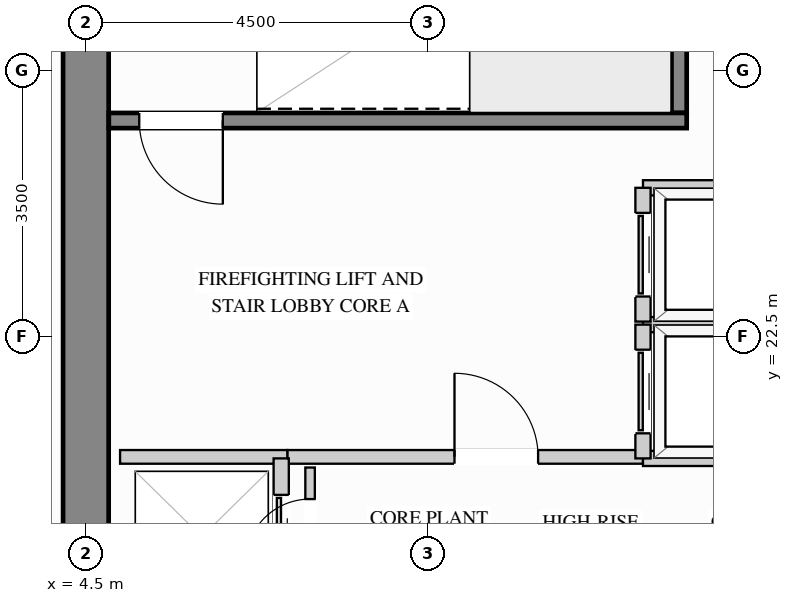
"""IFC4 building model, lengths in metres.
Left out: names, types, materials, properties, quantities, classifications, styles, units other than length and angle.
Written with IfcOpenShell. Run it as: python <this file> out.ifc"""

import sys

from ifc_helpers import new_model, si_unit, direction, frame, frame_2d, origin, place, context, subcontext, project, spatial, rectangle, extrude, source, transform, mapped, element, fill, save


model = new_model("IFC4")
c1 = context("Model", 3, precision=1e-05, world=origin(), true_north=direction((0.0, 1.0)))
c2 = subcontext(c1, "Body", "Model", "MODEL_VIEW")
j1 = project(units=[si_unit("LENGTHUNIT", "METRE"), si_unit("PLANEANGLEUNIT", "RADIAN")], contexts=[c1])
p1 = place(None, origin())
s1 = spatial("IfcSite", under=j1, at=p1, CompositionType="ELEMENT")
p2 = place(p1, origin())
s2 = spatial("IfcBuilding", under=s1, at=p2, CompositionType="ELEMENT")
p3 = place(p2, frame((0.0, 0.0, 186.3)))
s3 = spatial("IfcBuildingStorey", under=s2, at=p3, CompositionType="ELEMENT", Elevation=186.3)
m1 = source(origin(), c2, "Body", "SweptSolid", [
    extrude(rectangle(XDim=20.4, YDim=0.6, at=frame_2d((10.2, 0.0))), origin(), (0.0, 0.0, 1.0), 3.4),
])
p4 = place(p3, frame((4.5, 8.8, 0.0), z_axis=(0.0, 0.0, 1.0), x_axis=(0.0, 1.0, 0.0)))
e1 = element("IfcWall", 1, at=p4, inside=s3, PredefinedType="SHEAR", context=c2, shape_type="MappedRepresentation", body=[
    mapped(m1, transform((0.0, 0.0, 0.0), x_axis=(1.0, 0.0, 0.0), y_axis=(0.0, 1.0, 0.0), z_axis=(0.0, 0.0, 1.0))),
])
p5 = place(p3, frame((7.15, 20.92, 0.0), z_axis=(0.0, 0.0, 1.0), x_axis=(1.0, 0.0, 0.0)))
e2 = element("IfcWall", 2, at=p5, inside=s3, PredefinedType="PARTITIONING", context=c2, shape_type="SweptSolid", body=[
    extrude(rectangle(XDim=4.68, YDim=0.18, at=frame_2d((2.34, 0.0))), origin(), (0.0, 0.0, 1.0), 3.385),
])
p6 = place(p5, frame((2.2, 0.0, 0.0)))
e3 = element("IfcOpeningElement", 3, at=p6, cuts=e2, PredefinedType="OPENING", context=c2, shape_type="SweptSolid", body=[
    extrude(rectangle(XDim=1.1, YDim=2.15, at=frame_2d((0.55, 1.075))), frame((0.0, 0.1, 0.0), z_axis=(0.0, -1.0, 0.0), x_axis=(1.0, 0.0, 0.0)), (0.0, 0.0, 1.0), 0.2),
])
m2 = source(origin(), c2, "Body", "SweptSolid", [
    extrude(rectangle(XDim=2.2, YDim=0.18, at=frame_2d((1.1, 0.0))), origin(), (0.0, 0.0, 1.0), 3.385),
])
p7 = place(p3, frame((4.95, 20.92, 0.0), z_axis=(0.0, 0.0, 1.0), x_axis=(1.0, 0.0, 0.0)))
e4 = element("IfcWall", 4, at=p7, inside=s3, PredefinedType="PARTITIONING", context=c2, shape_type="MappedRepresentation", body=[
    mapped(m2, transform((0.0, 0.0, 0.0), x_axis=(1.0, 0.0, 0.0), y_axis=(0.0, 1.0, 0.0), z_axis=(0.0, 0.0, 1.0))),
])
p8 = place(p3, frame((7.45, 19.2, 0.0), z_axis=(0.0, 0.0, 1.0), x_axis=(0.0, 1.0, 0.0)))
e5 = element("IfcWall", 5, at=p8, inside=s3, PredefinedType="PARTITIONING", context=c2, shape_type="SweptSolid", body=[
    extrude(rectangle(XDim=1.58, YDim=0.125, at=frame_2d((0.79, 0.0))), origin(), (0.0, 0.0, 1.0), 3.385),
])
p9 = place(p8, frame((0.315, 0.0, 0.0)))
e6 = element("IfcOpeningElement", 6, at=p9, cuts=e5, PredefinedType="OPENING", context=c2, shape_type="SweptSolid", body=[
    extrude(rectangle(XDim=0.85, YDim=2.1, at=frame_2d((0.425, 1.05))), frame((0.0, 0.073, 0.0), z_axis=(0.0, -1.0, 0.0), x_axis=(1.0, 0.0, 0.0)), (0.0, 0.0, 1.0), 0.145),
])
m3 = source(origin(), c2, "Body", "SweptSolid", [
    extrude(rectangle(XDim=2.34, YDim=0.2, at=frame_2d((1.17, 0.0))), origin(), (0.0, 0.0, 1.0), 3.385),
])
for number, where, z_axis, x_axis in (
    (7, (11.83, 22.66, 0.0), (0.0, 0.0, 1.0), (1.0, 0.0, 0.0)),
    (8, (11.83, 20.9, 0.0), (0.0, 0.0, 1.0), (1.0, 0.0, 0.0)),
):
    element("IfcWall", number, at=place(p3, frame(where, z_axis=z_axis, x_axis=x_axis)), inside=s3, PredefinedType="PARTITIONING", context=c2, shape_type="MappedRepresentation", body=[
        mapped(m3, transform((0.0, 0.0, 0.0), x_axis=(1.0, 0.0, 0.0), y_axis=(0.0, 1.0, 0.0), z_axis=(0.0, 0.0, 1.0))),
    ])
p10 = place(p3, frame((11.83, 20.9, 0.0), z_axis=(0.0, 0.0, 1.0), x_axis=(0.0, 1.0, 0.0)))
e9 = element("IfcWall", 9, at=p10, inside=s3, PredefinedType="PARTITIONING", context=c2, shape_type="SweptSolid", body=[
    extrude(rectangle(XDim=1.76, YDim=0.2, at=frame_2d((0.88, 0.0))), origin(), (0.0, 0.0, 1.0), 3.385),
])
p11 = place(p10, frame((0.33, 0.0, 0.0)))
e10 = element("IfcOpeningElement", 10, at=p11, cuts=e9, PredefinedType="OPENING", context=c2, shape_type="SweptSolid", body=[
    extrude(rectangle(XDim=1.1, YDim=2.2, at=frame_2d((0.55, 1.1))), frame((0.0, 0.11, 0.0), z_axis=(0.0, -1.0, 0.0), x_axis=(1.0, 0.0, 0.0)), (0.0, 0.0, 1.0), 0.22),
])
p12 = place(p3, frame((11.83, 24.46, 0.0), z_axis=(0.0, 0.0, 1.0), x_axis=(1.0, 0.0, 0.0)))
e11 = element("IfcWall", 11, at=p12, inside=s3, PredefinedType="PARTITIONING", context=c2, shape_type="MappedRepresentation", body=[
    mapped(m3, transform((0.0, 0.0, 0.0), x_axis=(1.0, 0.0, 0.0), y_axis=(0.0, 1.0, 0.0), z_axis=(0.0, 0.0, 1.0))),
])
p13 = place(p3, frame((11.83, 22.7, 0.0), z_axis=(0.0, 0.0, 1.0), x_axis=(0.0, 1.0, 0.0)))
e12 = element("IfcWall", 12, at=p13, inside=s3, PredefinedType="PARTITIONING", context=c2, shape_type="SweptSolid", body=[
    extrude(rectangle(XDim=1.76, YDim=0.2, at=frame_2d((0.88, 0.0))), origin(), (0.0, 0.0, 1.0), 3.385),
])
p14 = place(p13, frame((0.33, 0.0, 0.0)))
e13 = element("IfcOpeningElement", 13, at=p14, cuts=e12, PredefinedType="OPENING", context=c2, shape_type="SweptSolid", body=[
    extrude(rectangle(XDim=1.1, YDim=2.2, at=frame_2d((0.55, 1.1))), frame((0.0, 0.11, 0.0), z_axis=(0.0, -1.0, 0.0), x_axis=(1.0, 0.0, 0.0)), (0.0, 0.0, 1.0), 0.22),
])
p15 = place(p3, frame((7.07, 18.84, 0.0), z_axis=(0.0, 0.0, 1.0), x_axis=(0.0, 1.0, 0.0)))
e14 = element("IfcWall", 14, at=p15, inside=s3, PredefinedType="PARTITIONING", context=c2, shape_type="SweptSolid", body=[
    extrude(rectangle(XDim=2.06, YDim=0.2, at=frame_2d((1.03, 0.0))), origin(), (0.0, 0.0, 1.0), 3.385),
])
p16 = place(p15, frame((0.48, 0.0, 0.0)))
e15 = element("IfcOpeningElement", 15, at=p16, cuts=e14, PredefinedType="OPENING", context=c2, shape_type="SweptSolid", body=[
    extrude(rectangle(XDim=1.1, YDim=2.2, at=frame_2d((0.55, 1.1))), frame((0.0, 0.11, 0.0), z_axis=(0.0, -1.0, 0.0), x_axis=(1.0, 0.0, 0.0)), (0.0, 0.0, 1.0), 0.22),
])
m4 = source(origin(), c2, "Body", "SweptSolid", [
    extrude(rectangle(XDim=3.753, YDim=0.2, at=frame_2d((1.876, 0.0))), origin(), (0.0, 0.0, 1.0), 3.4),
])
p17 = place(p3, frame((12.305, 25.445, 0.0), z_axis=(0.0, 0.0, 1.0), x_axis=(0.0, 1.0, 0.0)))
e16 = element("IfcWall", 16, at=p17, inside=s3, PredefinedType="SHEAR", context=c2, shape_type="MappedRepresentation", body=[
    mapped(m4, transform((0.0, 0.0, 0.0), x_axis=(1.0, 0.0, 0.0), y_axis=(0.0, 1.0, 0.0), z_axis=(0.0, 0.0, 1.0))),
])
p18 = place(p3, frame((4.802, 25.345, 0.0), z_axis=(0.0, 0.0, 1.0), x_axis=(1.0, 0.0, 0.0)))
e17 = element("IfcWall", 17, at=p18, inside=s3, PredefinedType="SHEAR", context=c2, shape_type="SweptSolid", body=[
    extrude(rectangle(XDim=7.603, YDim=0.2, at=frame_2d((3.802, 0.0))), origin(), (0.0, 0.0, 1.0), 3.4),
])
p19 = place(p18, frame((0.4, 0.0, 0.0)))
e18 = element("IfcOpeningElement", 18, at=p19, cuts=e17, PredefinedType="OPENING", context=c2, shape_type="SweptSolid", body=[
    extrude(rectangle(XDim=1.1, YDim=2.15, at=frame_2d((0.55, 1.075))), frame((0.0, 0.11, 0.0), z_axis=(0.0, -1.0, 0.0), x_axis=(1.0, 0.0, 0.0)), (0.0, 0.0, 1.0), 0.22),
])
m5 = source(origin(), c2, "Body", "SweptSolid", [
    extrude(rectangle(XDim=1.1, YDim=2.15, at=frame_2d((0.55, 1.075))), frame((0.0, 0.025, 0.0), z_axis=(0.0, -1.0, 0.0), x_axis=(1.0, 0.0, 0.0)), (0.0, 0.0, 1.0), 0.05),
])
p20 = place(p6, origin())
e19 = element("IfcDoor", 19, at=p20, inside=s3, OperationType="SINGLE_SWING_LEFT", PredefinedType="DOOR", context=c2, shape_type="MappedRepresentation", body=[
    mapped(m5, transform((0.0, 0.0, 0.0), x_axis=(1.0, 0.0, 0.0), y_axis=(0.0, 1.0, 0.0), z_axis=(0.0, 0.0, 1.0))),
])
fill(e3, e19)
m6 = source(origin(), c2, "Body", "SweptSolid", [
    extrude(rectangle(XDim=1.1, YDim=2.2, at=frame_2d((0.55, 1.1))), frame((0.0, 0.025, 0.0), z_axis=(0.0, -1.0, 0.0), x_axis=(1.0, 0.0, 0.0)), (0.0, 0.0, 1.0), 0.05),
])
p21 = place(p11, origin())
e20 = element("IfcDoor", 20, at=p21, inside=s3, OperationType="SLIDING_TO_LEFT", PredefinedType="DOOR", context=c2, shape_type="MappedRepresentation", body=[
    mapped(m6, transform((0.0, 0.0, 0.0), x_axis=(1.0, 0.0, 0.0), y_axis=(0.0, 1.0, 0.0), z_axis=(0.0, 0.0, 1.0))),
])
fill(e10, e20)
p22 = place(p14, origin())
e21 = element("IfcDoor", 21, at=p22, inside=s3, OperationType="SLIDING_TO_LEFT", PredefinedType="DOOR", context=c2, shape_type="MappedRepresentation", body=[
    mapped(m6, transform((0.0, 0.0, 0.0), x_axis=(1.0, 0.0, 0.0), y_axis=(0.0, 1.0, 0.0), z_axis=(0.0, 0.0, 1.0))),
])
fill(e13, e21)
p23 = place(p16, origin())
e22 = element("IfcDoor", 22, at=p23, inside=s3, OperationType="SLIDING_TO_LEFT", PredefinedType="DOOR", context=c2, shape_type="MappedRepresentation", body=[
    mapped(m6, transform((0.0, 0.0, 0.0), x_axis=(1.0, 0.0, 0.0), y_axis=(0.0, 1.0, 0.0), z_axis=(0.0, 0.0, 1.0))),
])
fill(e15, e22)
m7 = source(origin(), c2, "Body", "SweptSolid", [
    extrude(rectangle(XDim=0.85, YDim=2.1, at=frame_2d((0.425, 1.05))), frame((0.0, 0.025, 0.0), z_axis=(0.0, -1.0, 0.0), x_axis=(1.0, 0.0, 0.0)), (0.0, 0.0, 1.0), 0.05),
])
p24 = place(p9, origin())
e23 = element("IfcDoor", 23, at=p24, inside=s3, OperationType="SINGLE_SWING_LEFT", PredefinedType="DOOR", context=c2, shape_type="MappedRepresentation", body=[
    mapped(m7, transform((0.0, 0.0, 0.0), x_axis=(1.0, 0.0, 0.0), y_axis=(0.0, 1.0, 0.0), z_axis=(0.0, 0.0, 1.0))),
])
fill(e6, e23)
m8 = source(origin(), c2, "Body", "SweptSolid", [
    extrude(rectangle(XDim=1.1, YDim=2.15, at=frame_2d((0.55, 1.075))), frame((0.0, 0.025, 0.0), z_axis=(0.0, -1.0, 0.0), x_axis=(1.0, 0.0, 0.0)), (0.0, 0.0, 1.0), 0.05),
])
p25 = place(p19, origin())
e24 = element("IfcDoor", 24, at=p25, inside=s3, OperationType="SINGLE_SWING_RIGHT", PredefinedType="DOOR", context=c2, shape_type="MappedRepresentation", body=[
    mapped(m8, transform((0.0, 0.0, 0.0), x_axis=(1.0, 0.0, 0.0), y_axis=(0.0, 1.0, 0.0), z_axis=(0.0, 0.0, 1.0))),
])
fill(e18, e24)
save(model, sys.argv[1])
